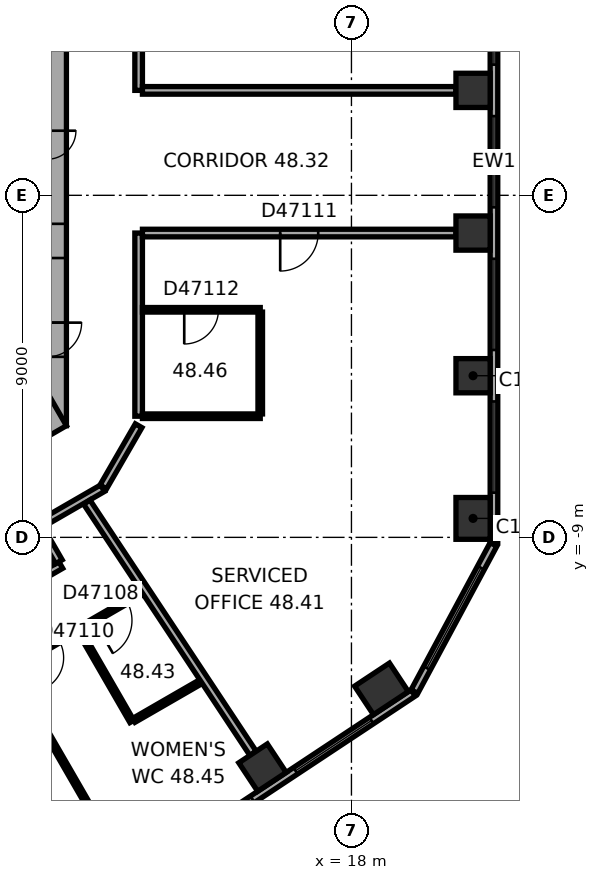
"""IFC4 building model, lengths in metres.
Left out: names, types, materials, properties, quantities, classifications, styles, units other than length and angle.
Written with IfcOpenShell. Run it as: python <this file> out.ifc"""

import sys

from ifc_helpers import new_model, si_unit, direction, frame, frame_2d, origin, origin_2d, place, context, subcontext, project, spatial, rectangle, extrude, element, fill, save


model = new_model("IFC4")
c1 = context("Model", 3, precision=1e-05, world=origin(), true_north=direction((0.0, 1.0)))
c2 = subcontext(c1, "Body", "Model", "MODEL_VIEW")
j1 = project(units=[si_unit("LENGTHUNIT", "METRE"), si_unit("PLANEANGLEUNIT", "RADIAN")], contexts=[c1])
p1 = place(None, origin())
s1 = spatial("IfcSite", under=j1, at=p1, CompositionType="ELEMENT")
p2 = place(p1, origin())
s2 = spatial("IfcBuilding", under=s1, at=p2, CompositionType="ELEMENT")
p3 = place(p2, frame((0.0, 0.0, 194.7)))
s3 = spatial("IfcBuildingStorey", under=s2, at=p3, CompositionType="ELEMENT", Elevation=194.7)
p4 = place(p3, frame((21.2, -8.501, 0.0), z_axis=(0.0, 0.0, 1.0), x_axis=(0.0, 1.0, 0.0)))
e1 = element("IfcColumn", 1, at=p4, inside=s3, PredefinedType="COLUMN", context=c2, shape_type="SweptSolid", body=[
    extrude(rectangle(XDim=1.1, YDim=0.9, at=origin_2d()), origin(), (0.0, 0.0, 1.0), 3.7),
])
for number, where, z_axis, x_axis in (
    (2, (21.2, -4.747, 0.0), (0.0, 0.0, 1.0), (0.0, 1.0, 0.0)),
    (3, (21.2, -0.993, 0.0), (0.0, 0.0, 1.0), (0.0, 1.0, 0.0)),
    (4, (21.2, 2.761, 0.0), (0.0, 0.0, 1.0), (0.0, 1.0, 0.0)),
    (5, (15.659, -15.058, 0.0), (0.0, 0.0, 1.0), (0.834, 0.552, 0.0)),
):
    element("IfcColumn", number, at=place(p3, frame(where, z_axis=z_axis, x_axis=x_axis)), inside=s3, PredefinedType="COLUMN", context=c2, shape_type="SweptSolid", body=[
        extrude(rectangle(XDim=0.9, YDim=0.9, at=origin_2d()), origin(), (0.0, 0.0, 1.0), 3.7),
    ])
p5 = place(p3, frame((18.79, -12.986, 0.0), z_axis=(0.0, 0.0, 1.0), x_axis=(0.833885822067, 0.551936985312, 0.0)))
e6 = element("IfcColumn", 6, at=p5, inside=s3, PredefinedType="COLUMN", context=c2, shape_type="SweptSolid", body=[
    extrude(rectangle(XDim=1.1, YDim=0.9, at=origin_2d()), origin(), (0.0, 0.0, 1.0), 3.7),
])
p6 = place(p3, frame((10.0, -6.062, 0.0), z_axis=(0.0, 0.0, 1.0), x_axis=(0.0, 1.0, 0.0)))
e7 = element("IfcWall", 7, at=p6, inside=s3, PredefinedType="SHEAR", context=c2, shape_type="SweptSolid", body=[
    extrude(rectangle(XDim=12.125, YDim=1.0, at=frame_2d((6.062, 0.0))), origin(), (0.0, 0.0, 1.0), 3.7),
])
p7 = place(p6, frame((6.262, 0.0, 0.0)))
e8 = element("IfcOpeningElement", 8, at=p7, cuts=e7, PredefinedType="OPENING", context=c2, shape_type="SweptSolid", body=[
    extrude(rectangle(XDim=1.5, YDim=2.1, at=frame_2d((0.75, 1.05))), frame((0.0, 0.51, 0.0), z_axis=(0.0, -1.0, 0.0), x_axis=(1.0, 0.0, 0.0)), (0.0, 0.0, 1.0), 1.02),
])
p8 = place(p6, frame((1.812, 0.0, 0.0)))
e9 = element("IfcOpeningElement", 9, at=p8, cuts=e7, PredefinedType="OPENING", context=c2, shape_type="SweptSolid", body=[
    extrude(rectangle(XDim=0.9, YDim=2.1, at=frame_2d((0.45, 1.05))), frame((0.0, 0.51, 0.0), z_axis=(0.0, -1.0, 0.0), x_axis=(1.0, 0.0, 0.0)), (0.0, 0.0, 1.0), 1.02),
])
p9 = place(p6, frame((4.412, 0.0, 0.0)))
e10 = element("IfcOpeningElement", 10, at=p9, cuts=e7, PredefinedType="OPENING", context=c2, shape_type="SweptSolid", body=[
    extrude(rectangle(XDim=0.9, YDim=2.1, at=frame_2d((0.45, 1.05))), frame((0.0, 0.51, 0.0), z_axis=(0.0, -1.0, 0.0), x_axis=(1.0, 0.0, 0.0)), (0.0, 0.0, 1.0), 1.02),
])
p10 = place(p3, frame((-0.25, -11.691, 0.0), z_axis=(0.0, 0.0, 1.0), x_axis=(0.866022616891, 0.50000482701, 0.0)))
e11 = element("IfcWall", 11, at=p10, inside=s3, PredefinedType="SHEAR", context=c2, shape_type="SweptSolid", body=[
    extrude(rectangle(XDim=12.125, YDim=1.0, at=frame_2d((6.062, 0.0))), origin(), (0.0, 0.0, 1.0), 3.7),
])
p11 = place(p10, frame((2.612, 0.0, 0.0)))
e12 = element("IfcOpeningElement", 12, at=p11, cuts=e11, PredefinedType="OPENING", context=c2, shape_type="SweptSolid", body=[
    extrude(rectangle(XDim=1.1, YDim=2.1, at=frame_2d((0.55, 1.05))), frame((0.0, 0.51, 0.0), z_axis=(0.0, -1.0, 0.0), x_axis=(1.0, 0.0, 0.0)), (0.0, 0.0, 1.0), 1.02),
])
p12 = place(p10, frame((5.212, 0.0, 0.0)))
e13 = element("IfcOpeningElement", 13, at=p12, cuts=e11, PredefinedType="OPENING", context=c2, shape_type="SweptSolid", body=[
    extrude(rectangle(XDim=1.1, YDim=2.1, at=frame_2d((0.55, 1.05))), frame((0.0, 0.51, 0.0), z_axis=(0.0, -1.0, 0.0), x_axis=(1.0, 0.0, 0.0)), (0.0, 0.0, 1.0), 1.02),
])
p13 = place(p10, frame((7.812, 0.0, 0.0)))
e14 = element("IfcOpeningElement", 14, at=p13, cuts=e11, PredefinedType="OPENING", context=c2, shape_type="SweptSolid", body=[
    extrude(rectangle(XDim=1.1, YDim=2.1, at=frame_2d((0.55, 1.05))), frame((0.0, 0.51, 0.0), z_axis=(0.0, -1.0, 0.0), x_axis=(1.0, 0.0, 0.0)), (0.0, 0.0, 1.0), 1.02),
])
p14 = place(p3, frame((21.75, -9.138, 0.0), z_axis=(0.0, 0.0, 1.0), x_axis=(0.0, 1.0, 0.0)))
e15 = element("IfcWall", 15, at=p14, inside=s3, PredefinedType="STANDARD", context=c2, shape_type="SweptSolid", body=[
    extrude(rectangle(XDim=20.044, YDim=0.2, at=frame_2d((10.022, 0.0))), origin(), (0.0, 0.0, 1.0), 3.7),
])
p15 = place(p14, frame((1.314, 0.0, 0.9)))
e16 = element("IfcOpeningElement", 16, at=p15, cuts=e15, PredefinedType="OPENING", context=c2, shape_type="SweptSolid", body=[
    extrude(rectangle(XDim=2.4, YDim=2.0, at=frame_2d((1.2, 1.0))), frame((0.0, 0.11, 0.0), z_axis=(0.0, -1.0, 0.0), x_axis=(1.0, 0.0, 0.0)), (0.0, 0.0, 1.0), 0.22),
])
p16 = place(p14, frame((5.069, 0.0, 0.9)))
e17 = element("IfcOpeningElement", 17, at=p16, cuts=e15, PredefinedType="OPENING", context=c2, shape_type="SweptSolid", body=[
    extrude(rectangle(XDim=2.4, YDim=2.0, at=frame_2d((1.2, 1.0))), frame((0.0, 0.11, 0.0), z_axis=(0.0, -1.0, 0.0), x_axis=(1.0, 0.0, 0.0)), (0.0, 0.0, 1.0), 0.22),
])
p17 = place(p14, frame((8.823, 0.0, 0.9)))
e18 = element("IfcOpeningElement", 18, at=p17, cuts=e15, PredefinedType="OPENING", context=c2, shape_type="SweptSolid", body=[
    extrude(rectangle(XDim=2.4, YDim=2.0, at=frame_2d((1.2, 1.0))), frame((0.0, 0.11, 0.0), z_axis=(0.0, -1.0, 0.0), x_axis=(1.0, 0.0, 0.0)), (0.0, 0.0, 1.0), 0.22),
])
p18 = place(p14, frame((12.577, 0.0, 0.9)))
e19 = element("IfcOpeningElement", 19, at=p18, cuts=e15, PredefinedType="OPENING", context=c2, shape_type="SweptSolid", body=[
    extrude(rectangle(XDim=2.4, YDim=2.0, at=frame_2d((1.2, 1.0))), frame((0.0, 0.11, 0.0), z_axis=(0.0, -1.0, 0.0), x_axis=(1.0, 0.0, 0.0)), (0.0, 0.0, 1.0), 0.22),
])
p19 = place(p14, frame((16.331, 0.0, 0.9)))
e20 = element("IfcOpeningElement", 20, at=p19, cuts=e15, PredefinedType="OPENING", context=c2, shape_type="SweptSolid", body=[
    extrude(rectangle(XDim=2.4, YDim=2.0, at=frame_2d((1.2, 1.0))), frame((0.0, 0.11, 0.0), z_axis=(0.0, -1.0, 0.0), x_axis=(1.0, 0.0, 0.0)), (0.0, 0.0, 1.0), 0.22),
])
p20 = place(p3, frame((2.911, -24.156, 0.0), z_axis=(0.0, 0.0, 1.0), x_axis=(0.833882163564, 0.551942512668, 0.0)))
e21 = element("IfcWall", 21, at=p20, inside=s3, PredefinedType="STANDARD", context=c2, shape_type="SweptSolid", body=[
    extrude(rectangle(XDim=20.044, YDim=0.2, at=frame_2d((10.022, 0.0))), origin(), (0.0, 0.0, 1.0), 3.7),
])
p21 = place(p20, frame((1.313, 0.0, 0.9)))
e22 = element("IfcOpeningElement", 22, at=p21, cuts=e21, PredefinedType="OPENING", context=c2, shape_type="SweptSolid", body=[
    extrude(rectangle(XDim=2.4, YDim=2.0, at=frame_2d((1.2, 1.0))), frame((0.0, 0.11, 0.0), z_axis=(0.0, -1.0, 0.0), x_axis=(1.0, 0.0, 0.0)), (0.0, 0.0, 1.0), 0.22),
])
p22 = place(p20, frame((5.067, 0.0, 0.9)))
e23 = element("IfcOpeningElement", 23, at=p22, cuts=e21, PredefinedType="OPENING", context=c2, shape_type="SweptSolid", body=[
    extrude(rectangle(XDim=2.4, YDim=2.0, at=frame_2d((1.2, 1.0))), frame((0.0, 0.11, 0.0), z_axis=(0.0, -1.0, 0.0), x_axis=(1.0, 0.0, 0.0)), (0.0, 0.0, 1.0), 0.22),
])
p23 = place(p20, frame((8.821, 0.0, 0.9)))
e24 = element("IfcOpeningElement", 24, at=p23, cuts=e21, PredefinedType="OPENING", context=c2, shape_type="SweptSolid", body=[
    extrude(rectangle(XDim=2.4, YDim=2.0, at=frame_2d((1.2, 1.0))), frame((0.0, 0.11, 0.0), z_axis=(0.0, -1.0, 0.0), x_axis=(1.0, 0.0, 0.0)), (0.0, 0.0, 1.0), 0.22),
])
p24 = place(p20, frame((12.575, 0.0, 0.9)))
e25 = element("IfcOpeningElement", 25, at=p24, cuts=e21, PredefinedType="OPENING", context=c2, shape_type="SweptSolid", body=[
    extrude(rectangle(XDim=2.4, YDim=2.0, at=frame_2d((1.2, 1.0))), frame((0.0, 0.11, 0.0), z_axis=(0.0, -1.0, 0.0), x_axis=(1.0, 0.0, 0.0)), (0.0, 0.0, 1.0), 0.22),
])
p25 = place(p20, frame((16.329, 0.0, 0.9)))
e26 = element("IfcOpeningElement", 26, at=p25, cuts=e21, PredefinedType="OPENING", context=c2, shape_type="SweptSolid", body=[
    extrude(rectangle(XDim=2.4, YDim=2.0, at=frame_2d((1.2, 1.0))), frame((0.0, 0.11, 0.0), z_axis=(0.0, -1.0, 0.0), x_axis=(1.0, 0.0, 0.0)), (0.0, 0.0, 1.0), 0.22),
])
p26 = place(p3, frame((19.658, -13.057, 0.0), z_axis=(0.0, 0.0, 1.0), x_axis=(0.473307879841, 0.880897071672, 0.0)))
e27 = element("IfcWall", 27, at=p26, inside=s3, PredefinedType="STANDARD", context=c2, shape_type="SweptSolid", body=[
    extrude(rectangle(XDim=4.395, YDim=0.2, at=frame_2d((2.197, 0.0))), origin(), (0.0, 0.0, 1.0), 3.7),
])
p27 = place(p26, frame((0.698, 0.0, 0.9)))
e28 = element("IfcOpeningElement", 28, at=p27, cuts=e27, PredefinedType="OPENING", context=c2, shape_type="SweptSolid", body=[
    extrude(rectangle(XDim=3.0, YDim=2.0, at=frame_2d((1.5, 1.0))), frame((0.0, 0.11, 0.0), z_axis=(0.0, -1.0, 0.0), x_axis=(1.0, 0.0, 0.0)), (0.0, 0.0, 1.0), 0.22),
])
p28 = place(p3, frame((2.816, -14.079, 0.0), z_axis=(0.0, 0.0, 1.0), x_axis=(0.866021128829, 0.500007404367, 0.0)))
e29 = element("IfcWall", 29, at=p28, inside=s3, PredefinedType="PARTITIONING", context=c2, shape_type="SweptSolid", body=[
    extrude(rectangle(XDim=8.702, YDim=0.2, at=frame_2d((4.351, 0.0))), origin(), (0.0, 0.0, 1.0), 3.42),
])
p29 = place(p28, frame((5.184, 0.0, 0.0)))
e30 = element("IfcOpeningElement", 30, at=p29, cuts=e29, PredefinedType="OPENING", context=c2, shape_type="SweptSolid", body=[
    extrude(rectangle(XDim=1.0, YDim=2.1, at=frame_2d((0.5, 1.05))), frame((0.0, 0.11, 0.0), z_axis=(0.0, -1.0, 0.0), x_axis=(1.0, 0.0, 0.0)), (0.0, 0.0, 1.0), 0.22),
])
p30 = place(p3, frame((6.152, -14.116, 0.0), z_axis=(0.0, 0.0, 1.0), x_axis=(0.866026788224, 0.499997602072, 0.0)))
e31 = element("IfcWall", 31, at=p30, inside=s3, PredefinedType="PARTITIONING", context=c2, shape_type="SweptSolid", body=[
    extrude(rectangle(XDim=7.322, YDim=0.12, at=frame_2d((3.661, 0.0))), origin(), (0.0, 0.0, 1.0), 3.42),
])
p31 = place(p30, frame((5.858, 0.0, 0.0)))
e32 = element("IfcOpeningElement", 32, at=p31, cuts=e31, PredefinedType="OPENING", context=c2, shape_type="SweptSolid", body=[
    extrude(rectangle(XDim=1.0, YDim=2.1, at=frame_2d((0.5, 1.05))), frame((0.0, 0.07, 0.0), z_axis=(0.0, -1.0, 0.0), x_axis=(1.0, 0.0, 0.0)), (0.0, 0.0, 1.0), 0.14),
])
p32 = place(p30, frame((1.2, 0.0, 0.0)))
e33 = element("IfcOpeningElement", 33, at=p32, cuts=e31, PredefinedType="OPENING", context=c2, shape_type="SweptSolid", body=[
    extrude(rectangle(XDim=0.9, YDim=2.1, at=frame_2d((0.45, 1.05))), frame((0.0, 0.07, 0.0), z_axis=(0.0, -1.0, 0.0), x_axis=(1.0, 0.0, 0.0)), (0.0, 0.0, 1.0), 0.14),
])
p33 = place(p30, frame((3.897, 0.0, 0.0)))
e34 = element("IfcOpeningElement", 34, at=p33, cuts=e31, PredefinedType="OPENING", context=c2, shape_type="SweptSolid", body=[
    extrude(rectangle(XDim=0.9, YDim=2.1, at=frame_2d((0.45, 1.05))), frame((0.0, 0.07, 0.0), z_axis=(0.0, -1.0, 0.0), x_axis=(1.0, 0.0, 0.0)), (0.0, 0.0, 1.0), 0.14),
])
p34 = place(p3, frame((9.752, -8.688, 0.0), z_axis=(0.0, 0.0, 1.0), x_axis=(0.865974105138, 0.500088841337, 0.0)))
e35 = element("IfcWall", 35, at=p34, inside=s3, PredefinedType="PARTITIONING", context=c2, shape_type="SweptSolid", body=[
    extrude(rectangle(XDim=1.961, YDim=0.2, at=frame_2d((0.98, 0.0))), origin(), (0.0, 0.0, 1.0), 3.42),
])
p35 = place(p3, frame((10.302, -9.642, 0.0), z_axis=(0.0, 0.0, 1.0), x_axis=(-0.500074377092, 0.865982457891, 0.0)))
e36 = element("IfcWall", 36, at=p35, inside=s3, PredefinedType="PARTITIONING", context=c2, shape_type="SweptSolid", body=[
    extrude(rectangle(XDim=1.001, YDim=0.2, at=frame_2d((0.5, 0.0))), origin(), (0.0, 0.0, 1.0), 3.42),
])
p36 = place(p3, frame((10.853, -11.472, 0.0), z_axis=(0.0, 0.0, 1.0), x_axis=(0.500048966069, -0.865997131366, 0.0)))
e37 = element("IfcWall", 37, at=p36, inside=s3, PredefinedType="PARTITIONING", context=c2, shape_type="SweptSolid", body=[
    extrude(rectangle(XDim=2.74, YDim=0.12, at=frame_2d((1.37, 0.0))), origin(), (0.0, 0.0, 1.0), 3.42),
])
p37 = place(p3, frame((11.47, -7.673, 0.0), z_axis=(0.0, 0.0, 1.0), x_axis=(0.499964847546, 0.866045698112, 0.0)))
e38 = element("IfcWall", 38, at=p37, inside=s3, PredefinedType="PARTITIONING", context=c2, shape_type="SweptSolid", body=[
    extrude(rectangle(XDim=1.86, YDim=0.2, at=frame_2d((0.93, 0.0))), origin(), (0.0, 0.0, 1.0), 3.42),
])
p38 = place(p3, frame((11.705, -17.136, 0.0), z_axis=(0.0, 0.0, 1.0), x_axis=(-0.499985382219, 0.8660338432, 0.0)))
e39 = element("IfcWall", 39, at=p38, inside=s3, PredefinedType="PARTITIONING", context=c2, shape_type="SweptSolid", body=[
    extrude(rectangle(XDim=5.332, YDim=0.12, at=frame_2d((2.666, 0.0))), origin(), (0.0, 0.0, 1.0), 3.42),
])
p39 = place(p3, frame((12.275, -13.814, 0.0), z_axis=(0.0, 0.0, 1.0), x_axis=(0.866010195725, 0.500026340207, 0.0)))
e40 = element("IfcWall", 40, at=p39, inside=s3, PredefinedType="PARTITIONING", context=c2, shape_type="SweptSolid", body=[
    extrude(rectangle(XDim=2.04, YDim=0.12, at=frame_2d((1.02, 0.0))), origin(), (0.0, 0.0, 1.0), 3.42),
])
p40 = place(p3, frame((12.4, -5.812, 0.0), z_axis=(0.0, 0.0, 1.0), x_axis=(0.0, 1.0, 0.0)))
e41 = element("IfcWall", 41, at=p40, inside=s3, PredefinedType="PARTITIONING", context=c2, shape_type="SweptSolid", body=[
    extrude(rectangle(XDim=4.819, YDim=0.2, at=frame_2d((2.41, 0.0))), origin(), (0.0, 0.0, 1.0), 3.42),
])
p41 = place(p3, frame((12.4, 2.761, 0.0), z_axis=(0.0, 0.0, 1.0), x_axis=(0.0, 1.0, 0.0)))
e42 = element("IfcWall", 42, at=p41, inside=s3, PredefinedType="PARTITIONING", context=c2, shape_type="SweptSolid", body=[
    extrude(rectangle(XDim=3.301, YDim=0.2, at=frame_2d((1.65, 0.0))), origin(), (0.0, 0.0, 1.0), 3.42),
])
p42 = place(p3, frame((12.5, -3.012, 0.0), z_axis=(0.0, 0.0, 1.0), x_axis=(1.0, 0.0, 0.0)))
e43 = element("IfcWall", 43, at=p42, inside=s3, PredefinedType="PARTITIONING", context=c2, shape_type="SweptSolid", body=[
    extrude(rectangle(XDim=3.1, YDim=0.12, at=frame_2d((1.55, 0.0))), origin(), (0.0, 0.0, 1.0), 3.42),
])
p43 = place(p42, frame((1.1, 0.0, 0.0)))
e44 = element("IfcOpeningElement", 44, at=p43, cuts=e43, PredefinedType="OPENING", context=c2, shape_type="SweptSolid", body=[
    extrude(rectangle(XDim=0.9, YDim=2.1, at=frame_2d((0.45, 1.05))), frame((0.0, 0.07, 0.0), z_axis=(0.0, -1.0, 0.0), x_axis=(1.0, 0.0, 0.0)), (0.0, 0.0, 1.0), 0.14),
])
p44 = place(p3, frame((12.5, -0.993, 0.0), z_axis=(0.0, 0.0, 1.0), x_axis=(1.0, 0.0, 0.0)))
e45 = element("IfcWall", 45, at=p44, inside=s3, PredefinedType="PARTITIONING", context=c2, shape_type="SweptSolid", body=[
    extrude(rectangle(XDim=8.25, YDim=0.2, at=frame_2d((4.125, 0.0))), origin(), (0.0, 0.0, 1.0), 2.87),
])
p45 = place(p44, frame((3.625, 0.0, 0.0)))
e46 = element("IfcOpeningElement", 46, at=p45, cuts=e45, PredefinedType="OPENING", context=c2, shape_type="SweptSolid", body=[
    extrude(rectangle(XDim=1.0, YDim=2.1, at=frame_2d((0.5, 1.05))), frame((0.0, 0.11, 0.0), z_axis=(0.0, -1.0, 0.0), x_axis=(1.0, 0.0, 0.0)), (0.0, 0.0, 1.0), 0.22),
])
p46 = place(p3, frame((15.411, -14.683, 0.0), z_axis=(0.0, 0.0, 1.0), x_axis=(-0.551932106251, 0.833889051427, 0.0)))
e47 = element("IfcWall", 47, at=p46, inside=s3, PredefinedType="PARTITIONING", context=c2, shape_type="SweptSolid", body=[
    extrude(rectangle(XDim=7.926, YDim=0.2, at=frame_2d((3.963, 0.0))), origin(), (0.0, 0.0, 1.0), 2.87),
])
p47 = place(p3, frame((15.6, -5.812, 0.0), z_axis=(0.0, 0.0, 1.0), x_axis=(-1.0, 0.0, 0.0)))
e48 = element("IfcWall", 48, at=p47, inside=s3, PredefinedType="PARTITIONING", context=c2, shape_type="SweptSolid", body=[
    extrude(rectangle(XDim=3.1, YDim=0.12, at=frame_2d((1.55, 0.0))), origin(), (0.0, 0.0, 1.0), 3.42),
])
p48 = place(p3, frame((15.6, -3.072, 0.0), z_axis=(0.0, 0.0, 1.0), x_axis=(0.0, -1.0, 0.0)))
e49 = element("IfcWall", 49, at=p48, inside=s3, PredefinedType="PARTITIONING", context=c2, shape_type="SweptSolid", body=[
    extrude(rectangle(XDim=2.68, YDim=0.12, at=frame_2d((1.34, 0.0))), origin(), (0.0, 0.0, 1.0), 3.42),
])
p49 = place(p3, frame((20.75, 2.761, 0.0), z_axis=(0.0, 0.0, 1.0), x_axis=(-1.0, 0.0, 0.0)))
e50 = element("IfcWall", 50, at=p49, inside=s3, PredefinedType="PARTITIONING", context=c2, shape_type="SweptSolid", body=[
    extrude(rectangle(XDim=8.25, YDim=0.2, at=frame_2d((4.125, 0.0))), origin(), (0.0, 0.0, 1.0), 3.42),
])
p50 = place(p15, origin())
e51 = element("IfcWindow", 51, at=p50, inside=s3, PartitioningType="SINGLE_PANEL", PredefinedType="WINDOW", context=c2, shape_type="SweptSolid", body=[
    extrude(rectangle(XDim=2.4, YDim=2.0, at=frame_2d((1.2, 1.0))), frame((0.0, 0.03, 0.0), z_axis=(0.0, -1.0, 0.0), x_axis=(1.0, 0.0, 0.0)), (0.0, 0.0, 1.0), 0.06),
])
fill(e16, e51)
p51 = place(p16, origin())
e52 = element("IfcWindow", 52, at=p51, inside=s3, PartitioningType="SINGLE_PANEL", PredefinedType="WINDOW", context=c2, shape_type="SweptSolid", body=[
    extrude(rectangle(XDim=2.4, YDim=2.0, at=frame_2d((1.2, 1.0))), frame((0.0, 0.03, 0.0), z_axis=(0.0, -1.0, 0.0), x_axis=(1.0, 0.0, 0.0)), (0.0, 0.0, 1.0), 0.06),
])
fill(e17, e52)
p52 = place(p17, origin())
e53 = element("IfcWindow", 53, at=p52, inside=s3, PartitioningType="SINGLE_PANEL", PredefinedType="WINDOW", context=c2, shape_type="SweptSolid", body=[
    extrude(rectangle(XDim=2.4, YDim=2.0, at=frame_2d((1.2, 1.0))), frame((0.0, 0.03, 0.0), z_axis=(0.0, -1.0, 0.0), x_axis=(1.0, 0.0, 0.0)), (0.0, 0.0, 1.0), 0.06),
])
fill(e18, e53)
p53 = place(p18, origin())
e54 = element("IfcWindow", 54, at=p53, inside=s3, PartitioningType="SINGLE_PANEL", PredefinedType="WINDOW", context=c2, shape_type="SweptSolid", body=[
    extrude(rectangle(XDim=2.4, YDim=2.0, at=frame_2d((1.2, 1.0))), frame((0.0, 0.03, 0.0), z_axis=(0.0, -1.0, 0.0), x_axis=(1.0, 0.0, 0.0)), (0.0, 0.0, 1.0), 0.06),
])
fill(e19, e54)
p54 = place(p24, origin())
e55 = element("IfcWindow", 55, at=p54, inside=s3, PartitioningType="SINGLE_PANEL", PredefinedType="WINDOW", context=c2, shape_type="SweptSolid", body=[
    extrude(rectangle(XDim=2.4, YDim=2.0, at=frame_2d((1.2, 1.0))), frame((0.0, 0.03, 0.0), z_axis=(0.0, -1.0, 0.0), x_axis=(1.0, 0.0, 0.0)), (0.0, 0.0, 1.0), 0.06),
])
fill(e25, e55)
p55 = place(p25, origin())
e56 = element("IfcWindow", 56, at=p55, inside=s3, PartitioningType="SINGLE_PANEL", PredefinedType="WINDOW", context=c2, shape_type="SweptSolid", body=[
    extrude(rectangle(XDim=2.4, YDim=2.0, at=frame_2d((1.2, 1.0))), frame((0.0, 0.03, 0.0), z_axis=(0.0, -1.0, 0.0), x_axis=(1.0, 0.0, 0.0)), (0.0, 0.0, 1.0), 0.06),
])
fill(e26, e56)
p56 = place(p27, origin())
e57 = element("IfcWindow", 57, at=p56, inside=s3, PartitioningType="SINGLE_PANEL", PredefinedType="WINDOW", context=c2, shape_type="SweptSolid", body=[
    extrude(rectangle(XDim=3.0, YDim=2.0, at=frame_2d((1.5, 1.0))), frame((0.0, 0.03, 0.0), z_axis=(0.0, -1.0, 0.0), x_axis=(1.0, 0.0, 0.0)), (0.0, 0.0, 1.0), 0.06),
])
fill(e28, e57)
p57 = place(p31, origin())
e58 = element("IfcDoor", 58, at=p57, inside=s3, OperationType="SINGLE_SWING_LEFT", PredefinedType="DOOR", context=c2, shape_type="SweptSolid", body=[
    extrude(rectangle(XDim=1.0, YDim=2.1, at=frame_2d((0.5, 1.05))), frame((0.0, 0.025, 0.0), z_axis=(0.0, -1.0, 0.0), x_axis=(1.0, 0.0, 0.0)), (0.0, 0.0, 1.0), 0.05),
])
fill(e32, e58)
p58 = place(p33, origin())
e59 = element("IfcDoor", 59, at=p58, inside=s3, OperationType="SINGLE_SWING_LEFT", PredefinedType="DOOR", context=c2, shape_type="SweptSolid", body=[
    extrude(rectangle(XDim=0.9, YDim=2.1, at=frame_2d((0.45, 1.05))), frame((0.0, 0.025, 0.0), z_axis=(0.0, -1.0, 0.0), x_axis=(1.0, 0.0, 0.0)), (0.0, 0.0, 1.0), 0.05),
])
fill(e34, e59)
p59 = place(p45, origin())
e60 = element("IfcDoor", 60, at=p59, inside=s3, OperationType="SINGLE_SWING_LEFT", PredefinedType="DOOR", context=c2, shape_type="SweptSolid", body=[
    extrude(rectangle(XDim=1.0, YDim=2.1, at=frame_2d((0.5, 1.05))), frame((0.0, 0.025, 0.0), z_axis=(0.0, -1.0, 0.0), x_axis=(1.0, 0.0, 0.0)), (0.0, 0.0, 1.0), 0.05),
])
fill(e46, e60)
p60 = place(p43, origin())
e61 = element("IfcDoor", 61, at=p60, inside=s3, OperationType="SINGLE_SWING_LEFT", PredefinedType="DOOR", context=c2, shape_type="SweptSolid", body=[
    extrude(rectangle(XDim=0.9, YDim=2.1, at=frame_2d((0.45, 1.05))), frame((0.0, 0.025, 0.0), z_axis=(0.0, -1.0, 0.0), x_axis=(1.0, 0.0, 0.0)), (0.0, 0.0, 1.0), 0.05),
])
fill(e44, e61)
save(model, sys.argv[1])
